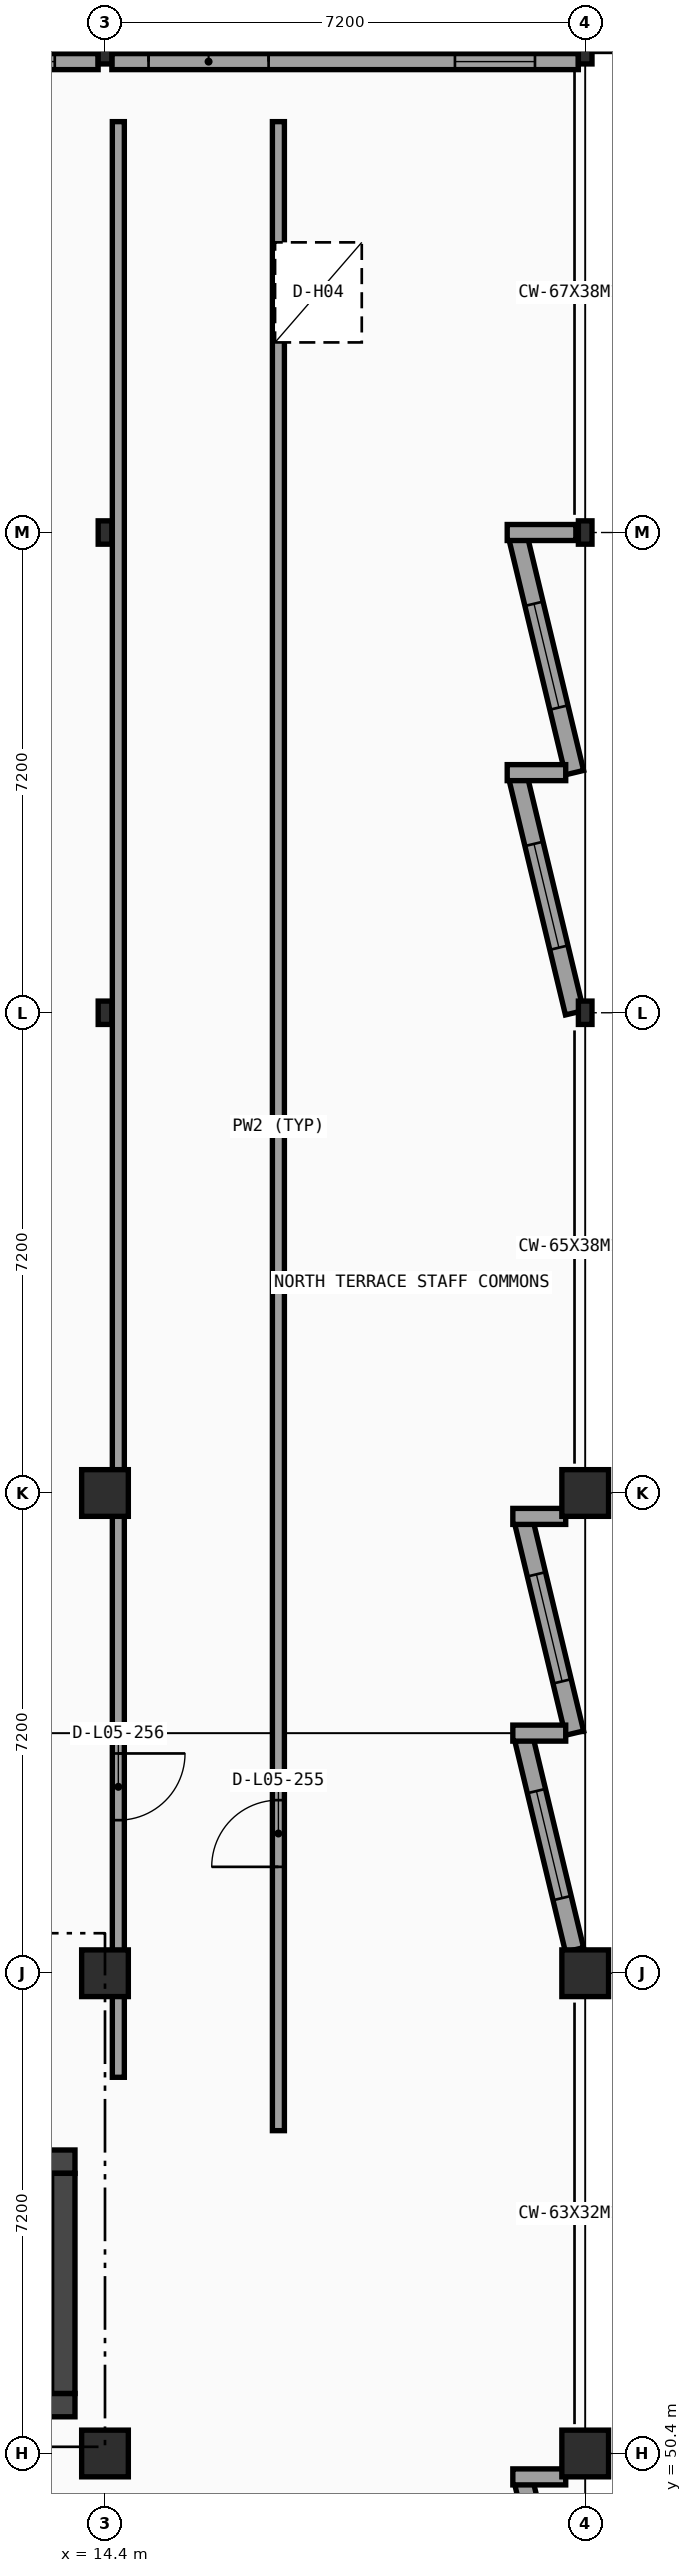
"""IFC4 building model, lengths in metres.
Left out: names, types, materials, properties, quantities, classifications, styles, units other than length and angle.
Written with IfcOpenShell. Run it as: python <this file> out.ifc"""

import sys

from ifc_helpers import new_model, si_unit, direction, frame, frame_2d, origin, origin_2d, place, context, subcontext, project, spatial, rectangle, i_section, extrude, element, fill, save


model = new_model("IFC4")
c1 = context("Model", 3, precision=1e-05, world=origin(), true_north=direction((0.0, 1.0)))
c2 = subcontext(c1, "Body", "Model", "MODEL_VIEW")
j1 = project(units=[si_unit("LENGTHUNIT", "METRE"), si_unit("PLANEANGLEUNIT", "RADIAN")], contexts=[c1])
p1 = place(None, origin())
s1 = spatial("IfcSite", under=j1, at=p1, CompositionType="ELEMENT")
p2 = place(p1, origin())
s2 = spatial("IfcBuilding", under=s1, at=p2, CompositionType="ELEMENT")
p3 = place(p2, frame((0.0, 0.0, 22.95)))
s3 = spatial("IfcBuildingStorey", under=s2, at=p3, CompositionType="ELEMENT", Elevation=22.95)
for number, where, z_axis, x_axis in (
    (1, (14.4, 50.4, 0.0), (0.0, 0.0, 1.0), (1.0, 0.0, 0.0)),
    (2, (14.4, 57.6, 0.0), (0.0, 0.0, 1.0), (1.0, 0.0, 0.0)),
    (3, (14.4, 64.8, 0.0), (0.0, 0.0, 1.0), (1.0, 0.0, 0.0)),
):
    element("IfcColumn", number, at=place(p3, frame(where, z_axis=z_axis, x_axis=x_axis)), inside=s3, PredefinedType="COLUMN", context=c2, shape_type="SweptSolid", body=[
        extrude(rectangle(XDim=0.7, YDim=0.7, at=origin_2d()), origin(), (0.0, 0.0, 1.0), 4.05),
    ])
for number, where, z_axis, x_axis in (
    (4, (14.4, 72.0, 0.0), (0.0, 0.0, 1.0), (1.0, 0.0, 0.0)),
    (5, (14.4, 79.2, 0.0), (0.0, 0.0, 1.0), (1.0, 0.0, 0.0)),
    (6, (14.4, 86.4, 0.0), (0.0, 0.0, 1.0), (1.0, 0.0, 0.0)),
):
    element("IfcColumn", number, at=place(p3, frame(where, z_axis=z_axis, x_axis=x_axis)), inside=s3, PredefinedType="COLUMN", context=c2, shape_type="SweptSolid", body=[
        extrude(i_section(OverallWidth=0.204, OverallDepth=0.35, WebThickness=0.009, FlangeThickness=0.015, FilletRadius=0.015, at=origin_2d()), origin(), (0.0, 0.0, 1.0), 4.05),
    ])
for number, where, z_axis, x_axis in (
    (7, (21.6, 50.4, 0.0), (0.0, 0.0, 1.0), (1.0, 0.0, 0.0)),
    (8, (21.6, 57.6, 0.0), (0.0, 0.0, 1.0), (1.0, 0.0, 0.0)),
    (9, (21.6, 64.8, 0.0), (0.0, 0.0, 1.0), (1.0, 0.0, 0.0)),
):
    element("IfcColumn", number, at=place(p3, frame(where, z_axis=z_axis, x_axis=x_axis)), inside=s3, PredefinedType="COLUMN", context=c2, shape_type="SweptSolid", body=[
        extrude(rectangle(XDim=0.7, YDim=0.7, at=origin_2d()), origin(), (0.0, 0.0, 1.0), 4.05),
    ])
for number, where, z_axis, x_axis in (
    (10, (21.6, 72.0, 0.0), (0.0, 0.0, 1.0), (1.0, 0.0, 0.0)),
    (11, (21.6, 79.2, 0.0), (0.0, 0.0, 1.0), (1.0, 0.0, 0.0)),
    (12, (21.6, 86.4, 0.0), (0.0, 0.0, 1.0), (1.0, 0.0, 0.0)),
):
    element("IfcColumn", number, at=place(p3, frame(where, z_axis=z_axis, x_axis=x_axis)), inside=s3, PredefinedType="COLUMN", context=c2, shape_type="SweptSolid", body=[
        extrude(i_section(OverallWidth=0.204, OverallDepth=0.35, WebThickness=0.009, FlangeThickness=0.015, FilletRadius=0.015, at=origin_2d()), origin(), (0.0, 0.0, 1.0), 4.05),
    ])
p4 = place(p3, frame((7.303, 86.26, 0.0), z_axis=(0.0, 0.0, 1.0), x_axis=(1.0, 0.0, 0.0)))
e13 = element("IfcWall", 13, at=p4, inside=s3, PredefinedType="SOLIDWALL", context=c2, shape_type="SweptSolid", body=[
    extrude(rectangle(XDim=6.994, YDim=0.24, at=frame_2d((3.497, 0.0))), origin(), (0.0, 0.0, 1.0), 3.8),
])
p5 = place(p4, frame((0.55, 0.0, 0.0)))
e14 = element("IfcOpeningElement", 14, at=p5, cuts=e13, PredefinedType="OPENING", context=c2, shape_type="SweptSolid", body=[
    extrude(rectangle(XDim=1.8, YDim=2.15, at=frame_2d((0.9, 1.075))), frame((0.0, 0.13, 0.0), z_axis=(0.0, -1.0, 0.0), x_axis=(1.0, 0.0, 0.0)), (0.0, 0.0, 1.0), 0.26),
])
p6 = place(p4, frame((5.144, 0.0, 0.85)))
e15 = element("IfcOpeningElement", 15, at=p6, cuts=e13, PredefinedType="OPENING", context=c2, shape_type="SweptSolid", body=[
    extrude(rectangle(XDim=1.2, YDim=1.95, at=frame_2d((0.6, 0.975))), frame((0.0, 0.13, 0.0), z_axis=(0.0, -1.0, 0.0), x_axis=(1.0, 0.0, 0.0)), (0.0, 0.0, 1.0), 0.26),
])
p7 = place(p3, frame((14.503, 86.26, 0.0), z_axis=(0.0, 0.0, 1.0), x_axis=(1.0, 0.0, 0.0)))
e16 = element("IfcWall", 16, at=p7, inside=s3, PredefinedType="SOLIDWALL", context=c2, shape_type="SweptSolid", body=[
    extrude(rectangle(XDim=6.994, YDim=0.24, at=frame_2d((3.497, 0.0))), origin(), (0.0, 0.0, 1.0), 3.8),
])
p8 = place(p7, frame((0.55, 0.0, 0.0)))
e17 = element("IfcOpeningElement", 17, at=p8, cuts=e16, PredefinedType="OPENING", context=c2, shape_type="SweptSolid", body=[
    extrude(rectangle(XDim=1.8, YDim=2.15, at=frame_2d((0.9, 1.075))), frame((0.0, 0.13, 0.0), z_axis=(0.0, -1.0, 0.0), x_axis=(1.0, 0.0, 0.0)), (0.0, 0.0, 1.0), 0.26),
])
p9 = place(p7, frame((5.144, 0.0, 0.85)))
e18 = element("IfcOpeningElement", 18, at=p9, cuts=e16, PredefinedType="OPENING", context=c2, shape_type="SweptSolid", body=[
    extrude(rectangle(XDim=1.2, YDim=1.95, at=frame_2d((0.6, 0.975))), frame((0.0, 0.13, 0.0), z_axis=(0.0, -1.0, 0.0), x_axis=(1.0, 0.0, 0.0)), (0.0, 0.0, 1.0), 0.26),
])
p10 = place(p3, frame((20.598, 79.108, 0.0), z_axis=(0.0, 0.0, 1.0), x_axis=(0.233431827365, -0.972373170122, 0.0)))
e19 = element("IfcWall", 19, at=p10, inside=s3, PredefinedType="SOLIDWALL", context=c2, shape_type="SweptSolid", body=[
    extrude(rectangle(XDim=3.607, YDim=0.28, at=frame_2d((1.804, 0.0))), origin(), (0.0, 0.0, 1.0), 3.8),
])
p11 = place(p10, frame((1.004, 0.0, 0.8)))
e20 = element("IfcOpeningElement", 20, at=p11, cuts=e19, PredefinedType="OPENING", context=c2, shape_type="SweptSolid", body=[
    extrude(rectangle(XDim=1.6, YDim=1.75, at=frame_2d((0.8, 0.875))), frame((0.0, 0.15, 0.0), z_axis=(0.0, -1.0, 0.0), x_axis=(1.0, 0.0, 0.0)), (0.0, 0.0, 1.0), 0.3),
])
p12 = place(p3, frame((20.431, 79.2, 0.0), z_axis=(0.0, 0.0, 1.0), x_axis=(1.0, 0.0, 0.0)))
e21 = element("IfcWall", 21, at=p12, inside=s3, PredefinedType="SOLIDWALL", context=c2, shape_type="SweptSolid", body=[
    extrude(rectangle(XDim=1.029, YDim=0.24, at=frame_2d((0.515, 0.0))), origin(), (0.0, 0.0, 1.0), 3.8),
])
p13 = place(p3, frame((20.598, 75.508, 0.0), z_axis=(0.0, 0.0, 1.0), x_axis=(0.233431827365, -0.972373170122, 0.0)))
e22 = element("IfcWall", 22, at=p13, inside=s3, PredefinedType="SOLIDWALL", context=c2, shape_type="SweptSolid", body=[
    extrude(rectangle(XDim=3.607, YDim=0.28, at=frame_2d((1.804, 0.0))), origin(), (0.0, 0.0, 1.0), 3.8),
])
p14 = place(p13, frame((1.004, 0.0, 0.8)))
e23 = element("IfcOpeningElement", 23, at=p14, cuts=e22, PredefinedType="OPENING", context=c2, shape_type="SweptSolid", body=[
    extrude(rectangle(XDim=1.6, YDim=1.75, at=frame_2d((0.8, 0.875))), frame((0.0, 0.15, 0.0), z_axis=(0.0, -1.0, 0.0), x_axis=(1.0, 0.0, 0.0)), (0.0, 0.0, 1.0), 0.3),
])
p15 = place(p3, frame((20.431, 75.6, 0.0), z_axis=(0.0, 0.0, 1.0), x_axis=(1.0, 0.0, 0.0)))
e24 = element("IfcWall", 24, at=p15, inside=s3, PredefinedType="SOLIDWALL", context=c2, shape_type="SweptSolid", body=[
    extrude(rectangle(XDim=0.877, YDim=0.24, at=frame_2d((0.439, 0.0))), origin(), (0.0, 0.0, 1.0), 3.8),
])
p16 = place(p3, frame((20.682, 64.357, 0.0), z_axis=(0.0, 0.0, 1.0), x_axis=(0.233429837788, -0.972373647746, 0.0)))
e25 = element("IfcWall", 25, at=p16, inside=s3, PredefinedType="SOLIDWALL", context=c2, shape_type="SweptSolid", body=[
    extrude(rectangle(XDim=3.246, YDim=0.28, at=frame_2d((1.623, 0.0))), origin(), (0.0, 0.0, 1.0), 3.216),
])
p17 = place(p16, frame((0.798, 0.0, 0.8)))
e26 = element("IfcOpeningElement", 26, at=p17, cuts=e25, PredefinedType="OPENING", context=c2, shape_type="SweptSolid", body=[
    extrude(rectangle(XDim=1.65, YDim=1.9, at=frame_2d((0.825, 0.95))), frame((0.0, 0.15, 0.0), z_axis=(0.0, -1.0, 0.0), x_axis=(1.0, 0.0, 0.0)), (0.0, 0.0, 1.0), 0.3),
])
p18 = place(p3, frame((20.515, 64.449, 0.0), z_axis=(0.0, 0.0, 1.0), x_axis=(1.0, 0.0, 0.0)))
e27 = element("IfcWall", 27, at=p18, inside=s3, PredefinedType="SOLIDWALL", context=c2, shape_type="SweptSolid", body=[
    extrude(rectangle(XDim=0.793, YDim=0.24, at=frame_2d((0.396, 0.0))), origin(), (0.0, 0.0, 1.0), 3.8),
])
p19 = place(p3, frame((20.682, 61.108, 0.0), z_axis=(0.0, 0.0, 1.0), x_axis=(0.233429837788, -0.972373647746, 0.0)))
e28 = element("IfcWall", 28, at=p19, inside=s3, PredefinedType="SOLIDWALL", context=c2, shape_type="SweptSolid", body=[
    extrude(rectangle(XDim=3.246, YDim=0.28, at=frame_2d((1.623, 0.0))), origin(), (0.0, 0.0, 1.0), 3.216),
])
p20 = place(p19, frame((0.798, 0.0, 0.8)))
e29 = element("IfcOpeningElement", 29, at=p20, cuts=e28, PredefinedType="OPENING", context=c2, shape_type="SweptSolid", body=[
    extrude(rectangle(XDim=1.65, YDim=1.9, at=frame_2d((0.825, 0.95))), frame((0.0, 0.15, 0.0), z_axis=(0.0, -1.0, 0.0), x_axis=(1.0, 0.0, 0.0)), (0.0, 0.0, 1.0), 0.3),
])
p21 = place(p3, frame((20.515, 61.2, 0.0), z_axis=(0.0, 0.0, 1.0), x_axis=(1.0, 0.0, 0.0)))
e30 = element("IfcWall", 30, at=p21, inside=s3, PredefinedType="SOLIDWALL", context=c2, shape_type="SweptSolid", body=[
    extrude(rectangle(XDim=0.793, YDim=0.24, at=frame_2d((0.396, 0.0))), origin(), (0.0, 0.0, 1.0), 3.8),
])
p22 = place(p3, frame((20.682, 49.957, 0.0), z_axis=(0.0, 0.0, 1.0), x_axis=(0.233446908634, -0.972369549528, 0.0)))
e31 = element("IfcWall", 31, at=p22, inside=s3, PredefinedType="SOLIDWALL", context=c2, shape_type="SweptSolid", body=[
    extrude(rectangle(XDim=3.246, YDim=0.28, at=frame_2d((1.623, 0.0))), origin(), (0.0, 0.0, 1.0), 3.216),
])
p23 = place(p22, frame((0.798, 0.0, 0.8)))
e32 = element("IfcOpeningElement", 32, at=p23, cuts=e31, PredefinedType="OPENING", context=c2, shape_type="SweptSolid", body=[
    extrude(rectangle(XDim=1.65, YDim=1.9, at=frame_2d((0.825, 0.95))), frame((0.0, 0.15, 0.0), z_axis=(0.0, -1.0, 0.0), x_axis=(1.0, 0.0, 0.0)), (0.0, 0.0, 1.0), 0.3),
])
p24 = place(p3, frame((20.515, 50.049, 0.0), z_axis=(0.0, 0.0, 1.0), x_axis=(1.0, 0.0, 0.0)))
e33 = element("IfcWall", 33, at=p24, inside=s3, PredefinedType="SOLIDWALL", context=c2, shape_type="SweptSolid", body=[
    extrude(rectangle(XDim=0.793, YDim=0.24, at=frame_2d((0.396, 0.0))), origin(), (0.0, 0.0, 1.0), 3.8),
])
for number, where, z_axis, x_axis in (
    (34, (4.65, 51.125, 0.0), (0.0, 0.0, 1.0), (1.0, 0.0, 0.0)),
    (35, (13.95, 54.775, 0.0), (0.0, 0.0, 1.0), (-1.0, 0.0, 0.0)),
):
    element("IfcWall", number, at=place(p3, frame(where, z_axis=z_axis, x_axis=x_axis)), inside=s3, PredefinedType="SHEAR", context=c2, shape_type="SweptSolid", body=[
        extrude(rectangle(XDim=9.3, YDim=0.35, at=frame_2d((4.65, 0.0))), origin(), (0.0, 0.0, 1.0), 3.8),
    ])
p25 = place(p3, frame((13.775, 51.3, 0.0), z_axis=(0.0, 0.0, 1.0), x_axis=(0.0, 1.0, 0.0)))
e36 = element("IfcWall", 36, at=p25, inside=s3, PredefinedType="SHEAR", context=c2, shape_type="SweptSolid", body=[
    extrude(rectangle(XDim=3.3, YDim=0.35, at=frame_2d((1.65, 0.0))), origin(), (0.0, 0.0, 1.0), 3.8),
])
p26 = place(p3, frame((17.0, 55.24, 0.0), z_axis=(0.0, 0.0, 1.0), x_axis=(0.0, 1.0, 0.0)))
e37 = element("IfcWall", 37, at=p26, inside=s3, PredefinedType="PARTITIONING", context=c2, shape_type="SweptSolid", body=[
    extrude(rectangle(XDim=30.12, YDim=0.18, at=frame_2d((15.06, 0.0))), origin(), (0.0, 0.0, 1.0), 3.206),
])
p27 = place(p26, frame((3.955, 0.0, 0.0)))
e38 = element("IfcOpeningElement", 38, at=p27, cuts=e37, PredefinedType="OPENING", context=c2, shape_type="SweptSolid", body=[
    extrude(rectangle(XDim=1.0, YDim=2.1, at=frame_2d((0.5, 1.05))), frame((0.0, 0.1, 0.0), z_axis=(0.0, -1.0, 0.0), x_axis=(1.0, 0.0, 0.0)), (0.0, 0.0, 1.0), 0.2),
])
p28 = place(p3, frame((14.6, 56.04, 0.0), z_axis=(0.0, 0.0, 1.0), x_axis=(0.0, 1.0, 0.0)))
e39 = element("IfcWall", 39, at=p28, inside=s3, PredefinedType="PARTITIONING", context=c2, shape_type="SweptSolid", body=[
    extrude(rectangle(XDim=29.32, YDim=0.18, at=frame_2d((14.66, 0.0))), origin(), (0.0, 0.0, 1.0), 3.206),
])
p29 = place(p28, frame((3.855, 0.0, 0.0)))
e40 = element("IfcOpeningElement", 40, at=p29, cuts=e39, PredefinedType="OPENING", context=c2, shape_type="SweptSolid", body=[
    extrude(rectangle(XDim=1.0, YDim=2.1, at=frame_2d((0.5, 1.05))), frame((0.0, 0.1, 0.0), z_axis=(0.0, -1.0, 0.0), x_axis=(1.0, 0.0, 0.0)), (0.0, 0.0, 1.0), 0.2),
])
p30 = place(p6, origin())
e41 = element("IfcWindow", 41, at=p30, inside=s3, PartitioningType="SINGLE_PANEL", PredefinedType="WINDOW", context=c2, shape_type="SweptSolid", body=[
    extrude(rectangle(XDim=1.2, YDim=1.95, at=frame_2d((0.6, 0.975))), frame((0.0, 0.03, 0.0), z_axis=(0.0, -1.0, 0.0), x_axis=(1.0, 0.0, 0.0)), (0.0, 0.0, 1.0), 0.06),
])
fill(e15, e41)
p31 = place(p8, origin())
e42 = element("IfcDoor", 42, at=p31, inside=s3, OperationType="DOUBLE_DOOR_SINGLE_SWING", PredefinedType="DOOR", context=c2, shape_type="SweptSolid", body=[
    extrude(rectangle(XDim=1.8, YDim=2.15, at=frame_2d((0.9, 1.075))), frame((0.0, 0.025, 0.0), z_axis=(0.0, -1.0, 0.0), x_axis=(1.0, 0.0, 0.0)), (0.0, 0.0, 1.0), 0.05),
])
fill(e17, e42)
p32 = place(p9, origin())
e43 = element("IfcWindow", 43, at=p32, inside=s3, PartitioningType="SINGLE_PANEL", PredefinedType="WINDOW", context=c2, shape_type="SweptSolid", body=[
    extrude(rectangle(XDim=1.2, YDim=1.95, at=frame_2d((0.6, 0.975))), frame((0.0, 0.03, 0.0), z_axis=(0.0, -1.0, 0.0), x_axis=(1.0, 0.0, 0.0)), (0.0, 0.0, 1.0), 0.06),
])
fill(e18, e43)
p33 = place(p11, origin())
e44 = element("IfcWindow", 44, at=p33, inside=s3, PartitioningType="SINGLE_PANEL", PredefinedType="WINDOW", context=c2, shape_type="SweptSolid", body=[
    extrude(rectangle(XDim=1.6, YDim=1.75, at=frame_2d((0.8, 0.875))), frame((0.0, 0.03, 0.0), z_axis=(0.0, -1.0, 0.0), x_axis=(1.0, 0.0, 0.0)), (0.0, 0.0, 1.0), 0.06),
])
fill(e20, e44)
p34 = place(p14, origin())
e45 = element("IfcWindow", 45, at=p34, inside=s3, PartitioningType="SINGLE_PANEL", PredefinedType="WINDOW", context=c2, shape_type="SweptSolid", body=[
    extrude(rectangle(XDim=1.6, YDim=1.75, at=frame_2d((0.8, 0.875))), frame((0.0, 0.03, 0.0), z_axis=(0.0, -1.0, 0.0), x_axis=(1.0, 0.0, 0.0)), (0.0, 0.0, 1.0), 0.06),
])
fill(e23, e45)
p35 = place(p17, origin())
e46 = element("IfcWindow", 46, at=p35, inside=s3, PartitioningType="SINGLE_PANEL", PredefinedType="WINDOW", context=c2, shape_type="SweptSolid", body=[
    extrude(rectangle(XDim=1.65, YDim=1.9, at=frame_2d((0.825, 0.95))), frame((0.0, 0.03, 0.0), z_axis=(0.0, -1.0, 0.0), x_axis=(1.0, 0.0, 0.0)), (0.0, 0.0, 1.0), 0.06),
])
fill(e26, e46)
p36 = place(p20, origin())
e47 = element("IfcWindow", 47, at=p36, inside=s3, PartitioningType="SINGLE_PANEL", PredefinedType="WINDOW", context=c2, shape_type="SweptSolid", body=[
    extrude(rectangle(XDim=1.65, YDim=1.9, at=frame_2d((0.825, 0.95))), frame((0.0, 0.03, 0.0), z_axis=(0.0, -1.0, 0.0), x_axis=(1.0, 0.0, 0.0)), (0.0, 0.0, 1.0), 0.06),
])
fill(e29, e47)
p37 = place(p3, frame((0.0, 0.0, -0.25)))
p38 = place(p37, frame((17.6, 82.8, 0.0)))
p39 = place(p38, frame((0.0, 0.0, 0.2)))
e48 = element("IfcDoor", 48, at=p39, inside=s3, OperationType="SINGLE_SWING_LEFT", PredefinedType="TRAPDOOR", context=c2, shape_type="SweptSolid", body=[
    extrude(rectangle(XDim=1.3, YDim=1.5, at=origin_2d()), origin(), (0.0, 0.0, 1.0), 0.05),
])
p40 = place(p27, origin())
e49 = element("IfcDoor", 49, at=p40, inside=s3, OperationType="SINGLE_SWING_LEFT", PredefinedType="DOOR", context=c2, shape_type="SweptSolid", body=[
    extrude(rectangle(XDim=1.0, YDim=2.1, at=frame_2d((0.5, 1.05))), frame((0.0, 0.025, 0.0), z_axis=(0.0, -1.0, 0.0), x_axis=(1.0, 0.0, 0.0)), (0.0, 0.0, 1.0), 0.05),
])
fill(e38, e49)
p41 = place(p29, origin())
e50 = element("IfcDoor", 50, at=p41, inside=s3, OperationType="SINGLE_SWING_RIGHT", PredefinedType="DOOR", context=c2, shape_type="SweptSolid", body=[
    extrude(rectangle(XDim=1.0, YDim=2.1, at=frame_2d((0.5, 1.05))), frame((0.0, 0.025, 0.0), z_axis=(0.0, -1.0, 0.0), x_axis=(1.0, 0.0, 0.0)), (0.0, 0.0, 1.0), 0.05),
])
fill(e40, e50)
save(model, sys.argv[1])
